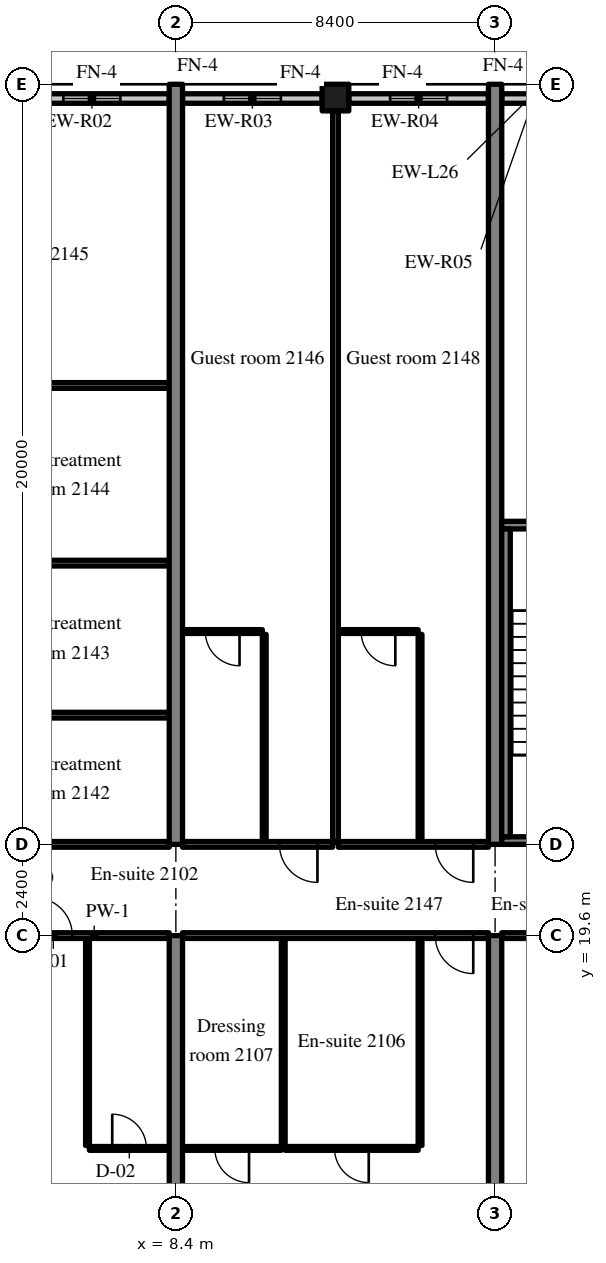
"""IFC4 building model, lengths in metres.
Left out: names, types, materials, properties, quantities, classifications, styles, units other than length and angle.
Written with IfcOpenShell. Run it as: python <this file> out.ifc"""

import sys

from ifc_helpers import new_model, si_unit, direction, frame, frame_2d, origin, origin_2d, place, context, subcontext, project, spatial, rectangle, extrude, source, transform, mapped, element, fill, save


model = new_model("IFC4")
c1 = context("Model", 3, precision=1e-05, world=origin(), true_north=direction((0.0, 1.0)))
c2 = subcontext(c1, "Body", "Model", "MODEL_VIEW")
j1 = project(units=[si_unit("LENGTHUNIT", "METRE"), si_unit("PLANEANGLEUNIT", "RADIAN")], contexts=[c1])
p1 = place(None, origin())
s1 = spatial("IfcSite", under=j1, at=p1, CompositionType="ELEMENT")
p2 = place(p1, origin())
s2 = spatial("IfcBuilding", under=s1, at=p2, CompositionType="ELEMENT")
p3 = place(p2, frame((0.0, 0.0, 91.4)))
s3 = spatial("IfcBuildingStorey", under=s2, at=p3, CompositionType="ELEMENT", Elevation=91.4)
m1 = source(origin(), c2, "Body", "SweptSolid", [
    extrude(rectangle(XDim=14.1, YDim=0.35, at=frame_2d((7.05, 0.0))), origin(), (0.0, 0.0, 1.0), 3.52),
])
p4 = place(p3, frame((8.4, 5.5, 0.0), z_axis=(0.0, 0.0, 1.0), x_axis=(0.0, 1.0, 0.0)))
e1 = element("IfcWall", 1, at=p4, inside=s3, PredefinedType="SHEAR", context=c2, shape_type="MappedRepresentation", body=[
    mapped(m1, transform((0.0, 0.0, 0.0), scale=1.0)),
])
m2 = source(origin(), c2, "Body", "SweptSolid", [
    extrude(rectangle(XDim=20.0, YDim=0.35, at=frame_2d((10.0, 0.0))), origin(), (0.0, 0.0, 1.0), 3.52),
])
p5 = place(p3, frame((8.4, 22.0, 0.0), z_axis=(0.0, 0.0, 1.0), x_axis=(0.0, 1.0, 0.0)))
e2 = element("IfcWall", 2, at=p5, inside=s3, PredefinedType="SHEAR", context=c2, shape_type="MappedRepresentation", body=[
    mapped(m2, transform((0.0, 0.0, 0.0), scale=1.0)),
])
p6 = place(p3, frame((16.8, 5.5, 0.0), z_axis=(0.0, 0.0, 1.0), x_axis=(0.0, 1.0, 0.0)))
e3 = element("IfcWall", 3, at=p6, inside=s3, PredefinedType="SHEAR", context=c2, shape_type="MappedRepresentation", body=[
    mapped(m1, transform((0.0, 0.0, 0.0), scale=1.0)),
])
p7 = place(p3, frame((16.8, 22.0, 0.0), z_axis=(0.0, 0.0, 1.0), x_axis=(0.0, 1.0, 0.0)))
e4 = element("IfcWall", 4, at=p7, inside=s3, PredefinedType="SHEAR", context=c2, shape_type="MappedRepresentation", body=[
    mapped(m2, transform((0.0, 0.0, 0.0), scale=1.0)),
])
m3 = source(origin(), c2, "Body", "SweptSolid", [
    extrude(rectangle(XDim=0.7, YDim=0.7, at=origin_2d()), origin(), (0.0, 0.0, 1.0), 3.52),
])
p8 = place(p3, frame((12.6, 41.65, 0.0), z_axis=(0.0, 0.0, 1.0), x_axis=(1.0, 0.0, 0.0)))
e5 = element("IfcColumn", 5, at=p8, inside=s3, PredefinedType="COLUMN", context=c2, shape_type="MappedRepresentation", body=[
    mapped(m3, transform((0.0, 0.0, 0.0), scale=1.0)),
])
m4 = source(origin(), c2, "Body", "SweptSolid", [
    extrude(rectangle(XDim=4.07, YDim=0.25, at=frame_2d((2.035, 0.0))), origin(), (0.0, 0.0, 1.0), 2.82),
])
p9 = place(p3, frame((8.225, 41.625, 0.0), z_axis=(0.0, 0.0, 1.0), x_axis=(-1.0, 0.0, 0.0)))
e6 = element("IfcWall", 6, at=p9, inside=s3, PredefinedType="SOLIDWALL", context=c2, shape_type="MappedRepresentation", body=[
    mapped(m4, transform((0.0, 0.0, 0.0), scale=1.0)),
])
m5 = source(origin(), c2, "Body", "SweptSolid", [
    extrude(rectangle(XDim=1.5, YDim=1.5, at=frame_2d((0.75, 0.75))), frame((0.0, 0.135, 0.0), z_axis=(0.0, -1.0, 0.0), x_axis=(1.0, 0.0, 0.0)), (0.0, 0.0, 1.0), 0.27),
])
p10 = place(p9, frame((1.285, 0.0, 0.9)))
e7 = element("IfcOpeningElement", 7, at=p10, cuts=e6, PredefinedType="OPENING", context=c2, shape_type="MappedRepresentation", body=[
    mapped(m5, transform((0.0, 0.0, 0.0), scale=1.0)),
])
m6 = source(origin(), c2, "Body", "SweptSolid", [
    extrude(rectangle(XDim=3.675, YDim=0.25, at=frame_2d((1.837, 0.0))), origin(), (0.0, 0.0, 1.0), 2.82),
])
p11 = place(p3, frame((12.25, 41.625, 0.0), z_axis=(0.0, 0.0, 1.0), x_axis=(-1.0, 0.0, 0.0)))
e8 = element("IfcWall", 8, at=p11, inside=s3, PredefinedType="SOLIDWALL", context=c2, shape_type="MappedRepresentation", body=[
    mapped(m6, transform((0.0, 0.0, 0.0), scale=1.0)),
])
p12 = place(p11, frame((1.087, 0.0, 0.9)))
e9 = element("IfcOpeningElement", 9, at=p12, cuts=e8, PredefinedType="OPENING", context=c2, shape_type="MappedRepresentation", body=[
    mapped(m5, transform((0.0, 0.0, 0.0), scale=1.0)),
])
p13 = place(p3, frame((16.625, 41.625, 0.0), z_axis=(0.0, 0.0, 1.0), x_axis=(-1.0, 0.0, 0.0)))
e10 = element("IfcWall", 10, at=p13, inside=s3, PredefinedType="SOLIDWALL", context=c2, shape_type="MappedRepresentation", body=[
    mapped(m6, transform((0.0, 0.0, 0.0), scale=1.0)),
])
p14 = place(p13, frame((1.087, 0.0, 0.9)))
e11 = element("IfcOpeningElement", 11, at=p14, cuts=e10, PredefinedType="OPENING", context=c2, shape_type="MappedRepresentation", body=[
    mapped(m5, transform((0.0, 0.0, 0.0), scale=1.0)),
])
m7 = source(origin(), c2, "Body", "SweptSolid", [
    extrude(rectangle(XDim=1.683, YDim=0.25, at=frame_2d((0.841, 0.0))), origin(), (0.0, 0.0, 1.0), 2.82),
])
p15 = place(p3, frame((18.658, 41.625, 0.0), z_axis=(0.0, 0.0, 1.0), x_axis=(-1.0, 0.0, 0.0)))
e12 = element("IfcWall", 12, at=p15, inside=s3, PredefinedType="SOLIDWALL", context=c2, shape_type="MappedRepresentation", body=[
    mapped(m7, transform((0.0, 0.0, 0.0), scale=1.0)),
])
m8 = source(origin(), c2, "Body", "SweptSolid", [
    extrude(rectangle(XDim=8.225, YDim=0.2, at=frame_2d((4.112, 0.0))), origin(), (0.0, 0.0, 1.0), 3.52),
])
p16 = place(p3, frame((16.975, 22.1, 0.0), z_axis=(0.0, 0.0, 1.0), x_axis=(1.0, 0.0, 0.0)))
e13 = element("IfcWall", 13, at=p16, inside=s3, PredefinedType="SOLIDWALL", context=c2, shape_type="MappedRepresentation", body=[
    mapped(m8, transform((0.0, 0.0, 0.0), scale=1.0)),
])
m9 = source(origin(), c2, "Body", "SweptSolid", [
    extrude(rectangle(XDim=1.2, YDim=2.1, at=frame_2d((0.6, 1.05))), frame((0.0, 0.11, 0.0), z_axis=(0.0, -1.0, 0.0), x_axis=(1.0, 0.0, 0.0)), (0.0, 0.0, 1.0), 0.22),
])
p17 = place(p16, frame((6.025, 0.0, 0.0)))
e14 = element("IfcOpeningElement", 14, at=p17, cuts=e13, PredefinedType="OPENING", context=c2, shape_type="MappedRepresentation", body=[
    mapped(m9, transform((0.0, 0.0, 0.0), scale=1.0)),
])
p18 = place(p3, frame((16.975, 30.4, 0.0), z_axis=(0.0, 0.0, 1.0), x_axis=(1.0, 0.0, 0.0)))
e15 = element("IfcWall", 15, at=p18, inside=s3, PredefinedType="SOLIDWALL", context=c2, shape_type="MappedRepresentation", body=[
    mapped(m8, transform((0.0, 0.0, 0.0), scale=1.0)),
])
m10 = source(origin(), c2, "Body", "SweptSolid", [
    extrude(rectangle(XDim=1.0, YDim=2.1, at=frame_2d((0.5, 1.05))), frame((0.0, 0.11, 0.0), z_axis=(0.0, -1.0, 0.0), x_axis=(1.0, 0.0, 0.0)), (0.0, 0.0, 1.0), 0.22),
])
p19 = place(p18, frame((6.125, 0.0, 0.0)))
e16 = element("IfcOpeningElement", 16, at=p19, cuts=e15, PredefinedType="OPENING", context=c2, shape_type="MappedRepresentation", body=[
    mapped(m10, transform((0.0, 0.0, 0.0), scale=1.0)),
])
m11 = source(origin(), c2, "Body", "SweptSolid", [
    extrude(rectangle(XDim=8.1, YDim=0.225, at=frame_2d((4.05, 0.0))), origin(), (0.0, 0.0, 1.0), 3.52),
])
p20 = place(p3, frame((17.087, 22.2, 0.0), z_axis=(0.0, 0.0, 1.0), x_axis=(0.0, 1.0, 0.0)))
e17 = element("IfcWall", 17, at=p20, inside=s3, PredefinedType="SOLIDWALL", context=c2, shape_type="MappedRepresentation", body=[
    mapped(m11, transform((0.0, 0.0, 0.0), scale=1.0)),
])
m12 = source(origin(), c2, "Body", "SweptSolid", [
    extrude(rectangle(XDim=5.45, YDim=0.1, at=frame_2d((2.725, 0.0))), origin(), (0.0, 0.0, 1.0), 3.52),
])
p21 = place(p3, frame((6.075, 14.075, 0.0), z_axis=(0.0, 0.0, 1.0), x_axis=(0.0, 1.0, 0.0)))
e18 = element("IfcWall", 18, at=p21, inside=s3, PredefinedType="PARTITIONING", context=c2, shape_type="MappedRepresentation", body=[
    mapped(m12, transform((0.0, 0.0, 0.0), scale=1.0)),
])
m13 = source(origin(), c2, "Body", "SweptSolid", [
    extrude(rectangle(XDim=2.1, YDim=0.1, at=frame_2d((1.05, 0.0))), origin(), (0.0, 0.0, 1.0), 3.52),
])
p22 = place(p3, frame((6.125, 14.0, 0.0), z_axis=(0.0, 0.0, 1.0), x_axis=(1.0, 0.0, 0.0)))
e19 = element("IfcWall", 19, at=p22, inside=s3, PredefinedType="PARTITIONING", context=c2, shape_type="MappedRepresentation", body=[
    mapped(m13, transform((0.0, 0.0, 0.0), scale=1.0)),
])
m14 = source(origin(), c2, "Body", "SweptSolid", [
    extrude(rectangle(XDim=0.9, YDim=2.1, at=frame_2d((0.45, 1.05))), frame((0.0, 0.06, 0.0), z_axis=(0.0, -1.0, 0.0), x_axis=(1.0, 0.0, 0.0)), (0.0, 0.0, 1.0), 0.12),
])
p23 = place(p22, frame((0.6, 0.0, 0.0)))
e20 = element("IfcOpeningElement", 20, at=p23, cuts=e19, PredefinedType="OPENING", context=c2, shape_type="MappedRepresentation", body=[
    mapped(m14, transform((0.0, 0.0, 0.0), scale=1.0)),
])
m15 = source(origin(), c2, "Body", "SweptSolid", [
    extrude(rectangle(XDim=3.95, YDim=0.15, at=frame_2d((1.975, 0.0))), origin(), (0.0, 0.0, 1.0), 2.82),
])
p24 = place(p3, frame((4.275, 19.6, 0.0), z_axis=(0.0, 0.0, 1.0), x_axis=(1.0, 0.0, 0.0)))
e21 = element("IfcWall", 21, at=p24, inside=s3, PredefinedType="PARTITIONING", context=c2, shape_type="MappedRepresentation", body=[
    mapped(m15, transform((0.0, 0.0, 0.0), scale=1.0)),
])
m16 = source(origin(), c2, "Body", "SweptSolid", [
    extrude(rectangle(XDim=1.0, YDim=2.1, at=frame_2d((0.5, 1.05))), frame((0.0, 0.085, 0.0), z_axis=(0.0, -1.0, 0.0), x_axis=(1.0, 0.0, 0.0)), (0.0, 0.0, 1.0), 0.17),
])
p25 = place(p24, frame((0.4, 0.0, 0.0)))
e22 = element("IfcOpeningElement", 22, at=p25, cuts=e21, PredefinedType="OPENING", context=c2, shape_type="MappedRepresentation", body=[
    mapped(m16, transform((0.0, 0.0, 0.0), scale=1.0)),
])
for number, where, z_axis, x_axis in (
    (23, (14.825, 14.075, 0.0), (0.0, 0.0, 1.0), (0.0, 1.0, 0.0)),
    (24, (11.225, 14.075, 0.0), (0.0, 0.0, 1.0), (0.0, 1.0, 0.0)),
):
    element("IfcWall", number, at=place(p3, frame(where, z_axis=z_axis, x_axis=x_axis)), inside=s3, PredefinedType="PARTITIONING", context=c2, shape_type="MappedRepresentation", body=[
        mapped(m12, transform((0.0, 0.0, 0.0), scale=1.0)),
    ])
m17 = source(origin(), c2, "Body", "SweptSolid", [
    extrude(rectangle(XDim=3.5, YDim=0.1, at=frame_2d((1.75, 0.0))), origin(), (0.0, 0.0, 1.0), 3.52),
])
p26 = place(p3, frame((11.275, 14.0, 0.0), z_axis=(0.0, 0.0, 1.0), x_axis=(1.0, 0.0, 0.0)))
e25 = element("IfcWall", 25, at=p26, inside=s3, PredefinedType="PARTITIONING", context=c2, shape_type="MappedRepresentation", body=[
    mapped(m17, transform((0.0, 0.0, 0.0), scale=1.0)),
])
p27 = place(p26, frame((1.3, 0.0, 0.0)))
e26 = element("IfcOpeningElement", 26, at=p27, cuts=e25, PredefinedType="OPENING", context=c2, shape_type="MappedRepresentation", body=[
    mapped(m14, transform((0.0, 0.0, 0.0), scale=1.0)),
])
m18 = source(origin(), c2, "Body", "SweptSolid", [
    extrude(rectangle(XDim=2.6, YDim=0.1, at=frame_2d((1.3, 0.0))), origin(), (0.0, 0.0, 1.0), 3.52),
])
p28 = place(p3, frame((8.575, 14.0, 0.0), z_axis=(0.0, 0.0, 1.0), x_axis=(1.0, 0.0, 0.0)))
e27 = element("IfcWall", 27, at=p28, inside=s3, PredefinedType="PARTITIONING", context=c2, shape_type="MappedRepresentation", body=[
    mapped(m18, transform((0.0, 0.0, 0.0), scale=1.0)),
])
p29 = place(p28, frame((0.85, 0.0, 0.0)))
e28 = element("IfcOpeningElement", 28, at=p29, cuts=e27, PredefinedType="OPENING", context=c2, shape_type="MappedRepresentation", body=[
    mapped(m14, transform((0.0, 0.0, 0.0), scale=1.0)),
])
m19 = source(origin(), c2, "Body", "SweptSolid", [
    extrude(rectangle(XDim=8.05, YDim=0.15, at=frame_2d((4.025, 0.0))), origin(), (0.0, 0.0, 1.0), 2.82),
])
p30 = place(p3, frame((8.575, 19.6, 0.0), z_axis=(0.0, 0.0, 1.0), x_axis=(1.0, 0.0, 0.0)))
e29 = element("IfcWall", 29, at=p30, inside=s3, PredefinedType="PARTITIONING", context=c2, shape_type="MappedRepresentation", body=[
    mapped(m19, transform((0.0, 0.0, 0.0), scale=1.0)),
])
p31 = place(p30, frame((6.65, 0.0, 0.0)))
e30 = element("IfcOpeningElement", 30, at=p31, cuts=e29, PredefinedType="OPENING", context=c2, shape_type="MappedRepresentation", body=[
    mapped(m16, transform((0.0, 0.0, 0.0), scale=1.0)),
])
m20 = source(origin(), c2, "Body", "SweptSolid", [
    extrude(rectangle(XDim=8.05, YDim=0.15, at=frame_2d((4.025, 0.0))), origin(), (0.0, 0.0, 1.0), 2.82),
])
p32 = place(p3, frame((16.975, 19.6, 0.0), z_axis=(0.0, 0.0, 1.0), x_axis=(1.0, 0.0, 0.0)))
e31 = element("IfcWall", 31, at=p32, inside=s3, PredefinedType="PARTITIONING", context=c2, shape_type="MappedRepresentation", body=[
    mapped(m20, transform((0.0, 0.0, 0.0), scale=1.0)),
])
m21 = source(origin(), c2, "Body", "SweptSolid", [
    extrude(rectangle(XDim=1.8, YDim=2.1, at=frame_2d((0.9, 1.05))), frame((0.0, 0.085, 0.0), z_axis=(0.0, -1.0, 0.0), x_axis=(1.0, 0.0, 0.0)), (0.0, 0.0, 1.0), 0.17),
])
p33 = place(p32, frame((3.125, 0.0, 0.0)))
e32 = element("IfcOpeningElement", 32, at=p33, cuts=e31, PredefinedType="OPENING", context=c2, shape_type="MappedRepresentation", body=[
    mapped(m21, transform((0.0, 0.0, 0.0), scale=1.0)),
])
m22 = source(origin(), c2, "Body", "SweptSolid", [
    extrude(rectangle(XDim=5.325, YDim=0.15, at=frame_2d((2.663, 0.0))), origin(), (0.0, 0.0, 1.0), 2.82),
])
p34 = place(p3, frame((2.9, 22.0, 0.0), z_axis=(0.0, 0.0, 1.0), x_axis=(1.0, 0.0, 0.0)))
e33 = element("IfcWall", 33, at=p34, inside=s3, PredefinedType="PARTITIONING", context=c2, shape_type="MappedRepresentation", body=[
    mapped(m22, transform((0.0, 0.0, 0.0), scale=1.0)),
])
m23 = source(origin(), c2, "Body", "SweptSolid", [
    extrude(rectangle(XDim=5.325, YDim=0.15, at=frame_2d((2.663, 0.0))), origin(), (0.0, 0.0, 1.0), 3.52),
])
for number, where, z_axis, x_axis in (
    (34, (2.9, 25.4, 0.0), (0.0, 0.0, 1.0), (1.0, 0.0, 0.0)),
    (35, (2.9, 29.4, 0.0), (0.0, 0.0, 1.0), (1.0, 0.0, 0.0)),
):
    element("IfcWall", number, at=place(p3, frame(where, z_axis=z_axis, x_axis=x_axis)), inside=s3, PredefinedType="PARTITIONING", context=c2, shape_type="MappedRepresentation", body=[
        mapped(m23, transform((0.0, 0.0, 0.0), scale=1.0)),
    ])
m24 = source(origin(), c2, "Body", "SweptSolid", [
    extrude(rectangle(XDim=7.875, YDim=0.15, at=frame_2d((3.938, 0.0))), origin(), (0.0, 0.0, 1.0), 3.52),
])
p35 = place(p3, frame((0.35, 34.075, 0.0), z_axis=(0.0, 0.0, 1.0), x_axis=(1.0, 0.0, 0.0)))
e36 = element("IfcWall", 36, at=p35, inside=s3, PredefinedType="PARTITIONING", context=c2, shape_type="MappedRepresentation", body=[
    mapped(m24, transform((0.0, 0.0, 0.0), scale=1.0)),
])
p36 = place(p35, frame((0.7, 0.0, 0.0)))
e37 = element("IfcOpeningElement", 37, at=p36, cuts=e36, PredefinedType="OPENING", context=c2, shape_type="MappedRepresentation", body=[
    mapped(m16, transform((0.0, 0.0, 0.0), scale=1.0)),
])
p37 = place(p3, frame((10.725, 22.075, 0.0), z_axis=(0.0, 0.0, 1.0), x_axis=(0.0, 1.0, 0.0)))
e38 = element("IfcWall", 38, at=p37, inside=s3, PredefinedType="PARTITIONING", context=c2, shape_type="MappedRepresentation", body=[
    mapped(m12, transform((0.0, 0.0, 0.0), scale=1.0)),
])
p38 = place(p3, frame((8.575, 27.6, 0.0), z_axis=(0.0, 0.0, 1.0), x_axis=(1.0, 0.0, 0.0)))
e39 = element("IfcWall", 39, at=p38, inside=s3, PredefinedType="PARTITIONING", context=c2, shape_type="MappedRepresentation", body=[
    mapped(m13, transform((0.0, 0.0, 0.0), scale=1.0)),
])
p39 = place(p38, frame((0.6, 0.0, 0.0)))
e40 = element("IfcOpeningElement", 40, at=p39, cuts=e39, PredefinedType="OPENING", context=c2, shape_type="MappedRepresentation", body=[
    mapped(m14, transform((0.0, 0.0, 0.0), scale=1.0)),
])
m25 = source(origin(), c2, "Body", "SweptSolid", [
    extrude(rectangle(XDim=3.95, YDim=0.15, at=frame_2d((1.975, 0.0))), origin(), (0.0, 0.0, 1.0), 2.82),
])
p40 = place(p3, frame((8.575, 22.0, 0.0), z_axis=(0.0, 0.0, 1.0), x_axis=(1.0, 0.0, 0.0)))
e41 = element("IfcWall", 41, at=p40, inside=s3, PredefinedType="PARTITIONING", context=c2, shape_type="MappedRepresentation", body=[
    mapped(m25, transform((0.0, 0.0, 0.0), scale=1.0)),
])
p41 = place(p40, frame((2.55, 0.0, 0.0)))
e42 = element("IfcOpeningElement", 42, at=p41, cuts=e41, PredefinedType="OPENING", context=c2, shape_type="MappedRepresentation", body=[
    mapped(m16, transform((0.0, 0.0, 0.0), scale=1.0)),
])
p42 = place(p3, frame((14.825, 22.075, 0.0), z_axis=(0.0, 0.0, 1.0), x_axis=(0.0, 1.0, 0.0)))
e43 = element("IfcWall", 43, at=p42, inside=s3, PredefinedType="PARTITIONING", context=c2, shape_type="MappedRepresentation", body=[
    mapped(m12, transform((0.0, 0.0, 0.0), scale=1.0)),
])
m26 = source(origin(), c2, "Body", "SweptSolid", [
    extrude(rectangle(XDim=2.1, YDim=0.1, at=frame_2d((1.05, 0.0))), origin(), (0.0, 0.0, 1.0), 3.52),
])
p43 = place(p3, frame((12.675, 27.6, 0.0), z_axis=(0.0, 0.0, 1.0), x_axis=(1.0, 0.0, 0.0)))
e44 = element("IfcWall", 44, at=p43, inside=s3, PredefinedType="PARTITIONING", context=c2, shape_type="MappedRepresentation", body=[
    mapped(m26, transform((0.0, 0.0, 0.0), scale=1.0)),
])
p44 = place(p43, frame((0.6, 0.0, 0.0)))
e45 = element("IfcOpeningElement", 45, at=p44, cuts=e44, PredefinedType="OPENING", context=c2, shape_type="MappedRepresentation", body=[
    mapped(m14, transform((0.0, 0.0, 0.0), scale=1.0)),
])
p45 = place(p3, frame((12.675, 22.0, 0.0), z_axis=(0.0, 0.0, 1.0), x_axis=(1.0, 0.0, 0.0)))
e46 = element("IfcWall", 46, at=p45, inside=s3, PredefinedType="PARTITIONING", context=c2, shape_type="MappedRepresentation", body=[
    mapped(m25, transform((0.0, 0.0, 0.0), scale=1.0)),
])
p46 = place(p45, frame((2.55, 0.0, 0.0)))
e47 = element("IfcOpeningElement", 47, at=p46, cuts=e46, PredefinedType="OPENING", context=c2, shape_type="MappedRepresentation", body=[
    mapped(m16, transform((0.0, 0.0, 0.0), scale=1.0)),
])
m27 = source(origin(), c2, "Body", "SweptSolid", [
    extrude(rectangle(XDim=19.225, YDim=0.15, at=frame_2d((9.613, 0.0))), origin(), (0.0, 0.0, 1.0), 3.52),
])
p47 = place(p3, frame((12.6, 22.075, 0.0), z_axis=(0.0, 0.0, 1.0), x_axis=(0.0, 1.0, 0.0)))
e48 = element("IfcWall", 48, at=p47, inside=s3, PredefinedType="PARTITIONING", context=c2, shape_type="MappedRepresentation", body=[
    mapped(m27, transform((0.0, 0.0, 0.0), scale=1.0)),
])
m28 = source(origin(), c2, "Body", "SweptSolid", [
    extrude(rectangle(XDim=1.5, YDim=1.5, at=frame_2d((0.75, 0.75))), frame((0.0, 0.03, 0.0), z_axis=(0.0, -1.0, 0.0), x_axis=(1.0, 0.0, 0.0)), (0.0, 0.0, 1.0), 0.06),
])
p48 = place(p10, origin())
e49 = element("IfcWindow", 49, at=p48, inside=s3, PartitioningType="SINGLE_PANEL", PredefinedType="WINDOW", context=c2, shape_type="MappedRepresentation", body=[
    mapped(m28, transform((0.0, 0.0, 0.0), scale=1.0)),
])
fill(e7, e49)
p49 = place(p12, origin())
e50 = element("IfcWindow", 50, at=p49, inside=s3, PartitioningType="SINGLE_PANEL", PredefinedType="WINDOW", context=c2, shape_type="MappedRepresentation", body=[
    mapped(m28, transform((0.0, 0.0, 0.0), scale=1.0)),
])
fill(e9, e50)
p50 = place(p14, origin())
e51 = element("IfcWindow", 51, at=p50, inside=s3, PartitioningType="SINGLE_PANEL", PredefinedType="WINDOW", context=c2, shape_type="MappedRepresentation", body=[
    mapped(m28, transform((0.0, 0.0, 0.0), scale=1.0)),
])
fill(e11, e51)
m29 = source(origin(), c2, "Body", "SweptSolid", [
    extrude(rectangle(XDim=0.9, YDim=2.1, at=frame_2d((0.45, 1.05))), frame((0.0, 0.025, 0.0), z_axis=(0.0, -1.0, 0.0), x_axis=(1.0, 0.0, 0.0)), (0.0, 0.0, 1.0), 0.05),
])
p51 = place(p23, origin())
e52 = element("IfcDoor", 52, at=p51, inside=s3, OperationType="SINGLE_SWING_LEFT", PredefinedType="DOOR", context=c2, shape_type="MappedRepresentation", body=[
    mapped(m29, transform((0.0, 0.0, 0.0), scale=1.0)),
])
fill(e20, e52)
m30 = source(origin(), c2, "Body", "SweptSolid", [
    extrude(rectangle(XDim=1.0, YDim=2.1, at=frame_2d((0.5, 1.05))), frame((0.0, 0.025, 0.0), z_axis=(0.0, -1.0, 0.0), x_axis=(1.0, 0.0, 0.0)), (0.0, 0.0, 1.0), 0.05),
])
p52 = place(p25, origin())
e53 = element("IfcDoor", 53, at=p52, inside=s3, OperationType="SINGLE_SWING_LEFT", PredefinedType="DOOR", context=c2, shape_type="MappedRepresentation", body=[
    mapped(m30, transform((0.0, 0.0, 0.0), scale=1.0)),
])
fill(e22, e53)
p53 = place(p27, origin())
e54 = element("IfcDoor", 54, at=p53, inside=s3, OperationType="SINGLE_SWING_RIGHT", PredefinedType="DOOR", context=c2, shape_type="MappedRepresentation", body=[
    mapped(m29, transform((0.0, 0.0, 0.0), scale=1.0)),
])
fill(e26, e54)
p54 = place(p29, origin())
e55 = element("IfcDoor", 55, at=p54, inside=s3, OperationType="SINGLE_SWING_RIGHT", PredefinedType="DOOR", context=c2, shape_type="MappedRepresentation", body=[
    mapped(m29, transform((0.0, 0.0, 0.0), scale=1.0)),
])
fill(e28, e55)
p55 = place(p31, origin())
e56 = element("IfcDoor", 56, at=p55, inside=s3, OperationType="SINGLE_SWING_RIGHT", PredefinedType="DOOR", context=c2, shape_type="MappedRepresentation", body=[
    mapped(m30, transform((0.0, 0.0, 0.0), scale=1.0)),
])
fill(e30, e56)
p56 = place(p39, origin())
e57 = element("IfcDoor", 57, at=p56, inside=s3, OperationType="SINGLE_SWING_RIGHT", PredefinedType="DOOR", context=c2, shape_type="MappedRepresentation", body=[
    mapped(m29, transform((0.0, 0.0, 0.0), scale=1.0)),
])
fill(e40, e57)
p57 = place(p41, origin())
e58 = element("IfcDoor", 58, at=p57, inside=s3, OperationType="SINGLE_SWING_RIGHT", PredefinedType="DOOR", context=c2, shape_type="MappedRepresentation", body=[
    mapped(m30, transform((0.0, 0.0, 0.0), scale=1.0)),
])
fill(e42, e58)
p58 = place(p44, origin())
e59 = element("IfcDoor", 59, at=p58, inside=s3, OperationType="SINGLE_SWING_RIGHT", PredefinedType="DOOR", context=c2, shape_type="MappedRepresentation", body=[
    mapped(m29, transform((0.0, 0.0, 0.0), scale=1.0)),
])
fill(e45, e59)
p59 = place(p46, origin())
e60 = element("IfcDoor", 60, at=p59, inside=s3, OperationType="SINGLE_SWING_RIGHT", PredefinedType="DOOR", context=c2, shape_type="MappedRepresentation", body=[
    mapped(m30, transform((0.0, 0.0, 0.0), scale=1.0)),
])
fill(e47, e60)
save(model, sys.argv[1])
